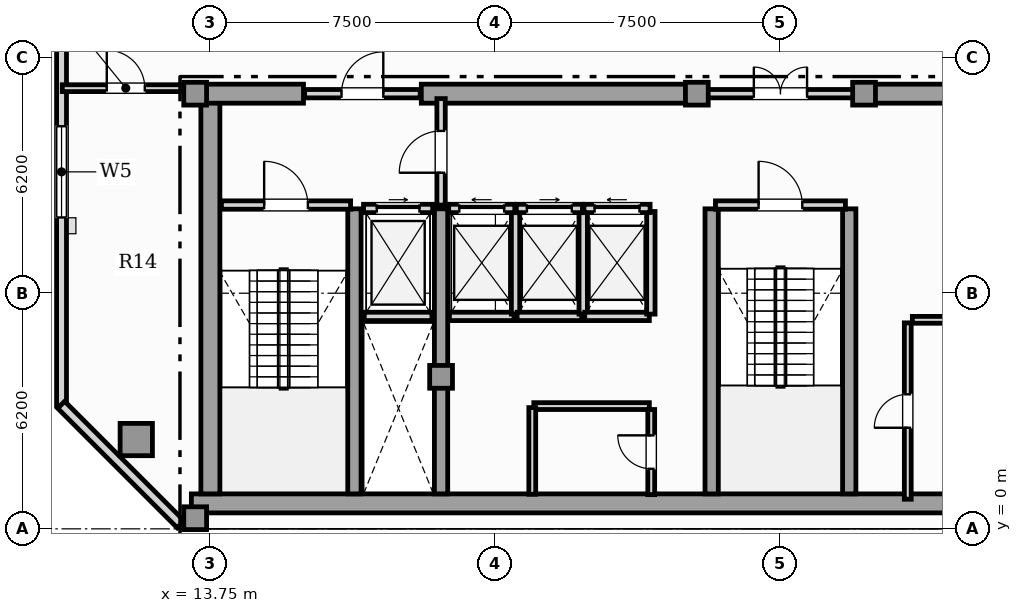
"""IFC4 building model, lengths in metres.
Left out: names, types, materials, properties, quantities, classifications, styles, units other than length and angle.
Written with IfcOpenShell. Run it as: python <this file> out.ifc"""

import sys

from ifc_helpers import new_model, si_unit, direction, frame, frame_2d, origin, origin_2d, place, context, subcontext, project, spatial, rectangle, hollow_rectangle, extrude, element, fill, save


model = new_model("IFC4")
c1 = context("Model", 3, precision=1e-05, world=origin(), true_north=direction((0.0, 1.0)))
c2 = subcontext(c1, "Body", "Model", "MODEL_VIEW")
j1 = project(units=[si_unit("LENGTHUNIT", "METRE"), si_unit("PLANEANGLEUNIT", "RADIAN")], contexts=[c1])
p1 = place(None, origin())
s1 = spatial("IfcSite", under=j1, at=p1, CompositionType="ELEMENT")
p2 = place(p1, origin())
s2 = spatial("IfcBuilding", under=s1, at=p2, CompositionType="ELEMENT")
p3 = place(p2, frame((0.0, 0.0, 357.85)))
s3 = spatial("IfcBuildingStorey", under=s2, at=p3, CompositionType="ELEMENT", Elevation=357.85)
p4 = place(p3, frame((13.25, 0.67, 0.0), z_axis=(0.0, 0.0, 1.0), x_axis=(1.0, 0.0, 0.0)))
e1 = element("IfcWall", 1, at=p4, inside=s3, PredefinedType="SHEAR", context=c2, shape_type="SweptSolid", body=[
    extrude(rectangle(XDim=31.0, YDim=0.5, at=frame_2d((15.5, 0.0))), origin(), (0.0, 0.0, 1.0), 4.14),
])
p5 = place(p3, frame((13.75, 0.92, 0.0), z_axis=(0.0, 0.0, 1.0), x_axis=(0.0, 1.0, 0.0)))
e2 = element("IfcWall", 2, at=p5, inside=s3, PredefinedType="SHEAR", context=c2, shape_type="SweptSolid", body=[
    extrude(rectangle(XDim=10.53, YDim=0.5, at=frame_2d((5.265, 0.0))), origin(), (0.0, 0.0, 1.0), 4.14),
])
p6 = place(p3, frame((13.25, 11.45, 0.0), z_axis=(0.0, 0.0, 1.0), x_axis=(1.0, 0.0, 0.0)))
e3 = element("IfcWall", 3, at=p6, inside=s3, PredefinedType="SHEAR", context=c2, shape_type="SweptSolid", body=[
    extrude(rectangle(XDim=2.95, YDim=0.5, at=frame_2d((1.475, 0.0))), origin(), (0.0, 0.0, 1.0), 4.14),
])
for number, where, z_axis, x_axis in (
    (4, (19.3, 11.45, 0.0), (0.0, 0.0, 1.0), (1.0, 0.0, 0.0)),
    (5, (30.9, 11.45, 0.0), (0.0, 0.0, 1.0), (1.0, 0.0, 0.0)),
):
    element("IfcWall", number, at=place(p3, frame(where, z_axis=z_axis, x_axis=x_axis)), inside=s3, PredefinedType="SHEAR", context=c2, shape_type="SweptSolid", body=[
        extrude(rectangle(XDim=7.3, YDim=0.5, at=frame_2d((3.65, 0.0))), origin(), (0.0, 0.0, 1.0), 4.14),
    ])
for number, where, z_axis, x_axis in (
    (6, (17.54, 0.92, 0.0), (0.0, 0.0, 1.0), (0.0, 1.0, 0.0)),
    (7, (19.82, 0.92, 0.0), (0.0, 0.0, 1.0), (0.0, 1.0, 0.0)),
    (8, (26.94, 0.92, 0.0), (0.0, 0.0, 1.0), (0.0, 1.0, 0.0)),
    (9, (30.56, 0.92, 0.0), (0.0, 0.0, 1.0), (0.0, 1.0, 0.0)),
):
    element("IfcWall", number, at=place(p3, frame(where, z_axis=z_axis, x_axis=x_axis)), inside=s3, PredefinedType="SHEAR", context=c2, shape_type="SweptSolid", body=[
        extrude(rectangle(XDim=7.5, YDim=0.35, at=frame_2d((3.75, 0.0))), origin(), (0.0, 0.0, 1.0), 4.14),
    ])
for number, where, z_axis, x_axis in (
    (10, (13.35, 0.28, 0.0), (0.0, 0.0, 1.0), (1.0, 0.0, 0.0)),
    (11, (13.35, 11.45, 0.0), (0.0, 0.0, 1.0), (1.0, 0.0, 0.0)),
    (12, (19.82, 4.0, 0.0), (0.0, 0.0, 1.0), (1.0, 0.0, 0.0)),
    (13, (26.55, 11.45, 0.0), (0.0, 0.0, 1.0), (1.0, 0.0, 0.0)),
    (14, (30.95, 11.45, 0.0), (0.0, 0.0, 1.0), (1.0, 0.0, 0.0)),
):
    element("IfcColumn", number, at=place(p3, frame(where, z_axis=z_axis, x_axis=x_axis)), inside=s3, PredefinedType="COLUMN", context=c2, shape_type="SweptSolid", body=[
        extrude(rectangle(XDim=0.6, YDim=0.6, at=origin_2d()), origin(), (0.0, 0.0, 1.0), 4.4),
    ])
p7 = place(p3, frame((11.8, 2.35, 0.0), z_axis=(0.0, 0.0, 1.0), x_axis=(1.0, 0.0, 0.0)))
e15 = element("IfcColumn", 15, at=p7, inside=s3, PredefinedType="USERDEFINED", context=c2, shape_type="SweptSolid", body=[
    extrude(hollow_rectangle(XDim=0.85, YDim=0.85, WallThickness=0.05, at=origin_2d()), origin(), (0.0, 0.0, 1.0), 4.4),
])
p8 = place(p3, frame((9.834, 27.586, 0.0), z_axis=(0.0, 0.0, 1.0), x_axis=(0.0, -1.0, 0.0)))
e16 = element("IfcWall", 16, at=p8, inside=s3, PredefinedType="SOLIDWALL", context=c2, shape_type="SweptSolid", body=[
    extrude(rectangle(XDim=24.346, YDim=0.26, at=frame_2d((12.173, 0.0))), origin(), (0.0, 0.0, 1.0), 4.14),
])
p9 = place(p8, frame((16.992, 0.0, 0.85)))
e17 = element("IfcOpeningElement", 17, at=p9, cuts=e16, PredefinedType="OPENING", context=c2, shape_type="SweptSolid", body=[
    extrude(rectangle(XDim=2.4, YDim=2.0, at=frame_2d((1.2, 1.0))), frame((0.0, 0.14, 0.0), z_axis=(0.0, -1.0, 0.0), x_axis=(1.0, 0.0, 0.0)), (0.0, 0.0, 1.0), 0.28),
])
p10 = place(p8, frame((2.83, 0.0, 0.95)))
e18 = element("IfcOpeningElement", 18, at=p10, cuts=e16, PredefinedType="OPENING", context=c2, shape_type="SweptSolid", body=[
    extrude(rectangle(XDim=0.9, YDim=1.5, at=frame_2d((0.45, 0.75))), frame((0.0, 0.14, 0.0), z_axis=(0.0, -1.0, 0.0), x_axis=(1.0, 0.0, 0.0)), (0.0, 0.0, 1.0), 0.28),
])
p11 = place(p3, frame((9.824, 3.264, 0.0), z_axis=(0.0, 0.0, 1.0), x_axis=(0.707079321262, -0.707134240044, 0.0)))
e19 = element("IfcWall", 19, at=p11, inside=s3, PredefinedType="SOLIDWALL", context=c2, shape_type="SweptSolid", body=[
    extrude(rectangle(XDim=4.446, YDim=0.26, at=frame_2d((2.223, 0.0))), origin(), (0.0, 0.0, 1.0), 4.14),
])
p12 = place(p3, frame((17.8, 5.59, 0.0), z_axis=(0.0, 0.0, 1.0), x_axis=(1.0, 0.0, 0.0)))
e20 = element("IfcWall", 20, at=p12, inside=s3, PredefinedType="SOLIDWALL", context=c2, shape_type="SweptSolid", body=[
    extrude(rectangle(XDim=1.78, YDim=0.22, at=frame_2d((0.89, 0.0))), origin(), (0.0, 0.0, 1.0), 4.14),
])
p13 = place(p3, frame((17.78, 8.43, 0.0), z_axis=(0.0, 0.0, 1.0), x_axis=(1.0, 0.0, 0.0)))
e21 = element("IfcWall", 21, at=p13, inside=s3, PredefinedType="SOLIDWALL", context=c2, shape_type="SweptSolid", body=[
    extrude(rectangle(XDim=1.82, YDim=0.22, at=frame_2d((0.91, 0.0))), origin(), (0.0, 0.0, 1.0), 4.14),
])
p14 = place(p13, frame((0.35, 0.0, 0.0)))
e22 = element("IfcOpeningElement", 22, at=p14, cuts=e21, PredefinedType="OPENING", context=c2, shape_type="SweptSolid", body=[
    extrude(rectangle(XDim=1.12, YDim=2.25, at=frame_2d((0.56, 1.125))), frame((0.0, 0.12, 0.0), z_axis=(0.0, -1.0, 0.0), x_axis=(1.0, 0.0, 0.0)), (0.0, 0.0, 1.0), 0.24),
])
p15 = place(p3, frame((20.04, 5.59, 0.0), z_axis=(0.0, 0.0, 1.0), x_axis=(1.0, 0.0, 0.0)))
e23 = element("IfcWall", 23, at=p15, inside=s3, PredefinedType="SOLIDWALL", context=c2, shape_type="SweptSolid", body=[
    extrude(rectangle(XDim=1.7, YDim=0.22, at=frame_2d((0.85, 0.0))), origin(), (0.0, 0.0, 1.0), 4.14),
])
p16 = place(p3, frame((21.78, 5.65, 0.0), z_axis=(0.0, 0.0, 1.0), x_axis=(0.0, 1.0, 0.0)))
e24 = element("IfcWall", 24, at=p16, inside=s3, PredefinedType="SOLIDWALL", context=c2, shape_type="SweptSolid", body=[
    extrude(rectangle(XDim=2.7, YDim=0.22, at=frame_2d((1.35, 0.0))), origin(), (0.0, 0.0, 1.0), 4.14),
])
p17 = place(p3, frame((20.02, 8.43, 0.0), z_axis=(0.0, 0.0, 1.0), x_axis=(1.0, 0.0, 0.0)))
e25 = element("IfcWall", 25, at=p17, inside=s3, PredefinedType="SOLIDWALL", context=c2, shape_type="SweptSolid", body=[
    extrude(rectangle(XDim=1.74, YDim=0.22, at=frame_2d((0.87, 0.0))), origin(), (0.0, 0.0, 1.0), 4.14),
])
p18 = place(p17, frame((0.28, 0.0, 0.0)))
e26 = element("IfcOpeningElement", 26, at=p18, cuts=e25, PredefinedType="OPENING", context=c2, shape_type="SweptSolid", body=[
    extrude(rectangle(XDim=1.18, YDim=2.2, at=frame_2d((0.59, 1.1))), frame((0.0, 0.12, 0.0), z_axis=(0.0, -1.0, 0.0), x_axis=(1.0, 0.0, 0.0)), (0.0, 0.0, 1.0), 0.24),
])
p19 = place(p3, frame((21.82, 5.59, 0.0), z_axis=(0.0, 0.0, 1.0), x_axis=(1.0, 0.0, 0.0)))
e27 = element("IfcWall", 27, at=p19, inside=s3, PredefinedType="SOLIDWALL", context=c2, shape_type="SweptSolid", body=[
    extrude(rectangle(XDim=1.7, YDim=0.22, at=frame_2d((0.85, 0.0))), origin(), (0.0, 0.0, 1.0), 4.14),
])
p20 = place(p3, frame((23.56, 5.65, 0.0), z_axis=(0.0, 0.0, 1.0), x_axis=(0.0, 1.0, 0.0)))
e28 = element("IfcWall", 28, at=p20, inside=s3, PredefinedType="SOLIDWALL", context=c2, shape_type="SweptSolid", body=[
    extrude(rectangle(XDim=2.7, YDim=0.22, at=frame_2d((1.35, 0.0))), origin(), (0.0, 0.0, 1.0), 4.14),
])
p21 = place(p3, frame((21.8, 8.43, 0.0), z_axis=(0.0, 0.0, 1.0), x_axis=(1.0, 0.0, 0.0)))
e29 = element("IfcWall", 29, at=p21, inside=s3, PredefinedType="SOLIDWALL", context=c2, shape_type="SweptSolid", body=[
    extrude(rectangle(XDim=1.74, YDim=0.22, at=frame_2d((0.87, 0.0))), origin(), (0.0, 0.0, 1.0), 4.14),
])
p22 = place(p21, frame((0.28, 0.0, 0.0)))
e30 = element("IfcOpeningElement", 30, at=p22, cuts=e29, PredefinedType="OPENING", context=c2, shape_type="SweptSolid", body=[
    extrude(rectangle(XDim=1.18, YDim=2.2, at=frame_2d((0.59, 1.1))), frame((0.0, 0.12, 0.0), z_axis=(0.0, -1.0, 0.0), x_axis=(1.0, 0.0, 0.0)), (0.0, 0.0, 1.0), 0.24),
])
p23 = place(p3, frame((23.6, 5.59, 0.0), z_axis=(0.0, 0.0, 1.0), x_axis=(1.0, 0.0, 0.0)))
e31 = element("IfcWall", 31, at=p23, inside=s3, PredefinedType="SOLIDWALL", context=c2, shape_type="SweptSolid", body=[
    extrude(rectangle(XDim=1.7, YDim=0.22, at=frame_2d((0.85, 0.0))), origin(), (0.0, 0.0, 1.0), 4.14),
])
p24 = place(p3, frame((25.34, 5.65, 0.0), z_axis=(0.0, 0.0, 1.0), x_axis=(0.0, 1.0, 0.0)))
e32 = element("IfcWall", 32, at=p24, inside=s3, PredefinedType="SOLIDWALL", context=c2, shape_type="SweptSolid", body=[
    extrude(rectangle(XDim=2.7, YDim=0.22, at=frame_2d((1.35, 0.0))), origin(), (0.0, 0.0, 1.0), 4.14),
])
p25 = place(p3, frame((23.58, 8.43, 0.0), z_axis=(0.0, 0.0, 1.0), x_axis=(1.0, 0.0, 0.0)))
e33 = element("IfcWall", 33, at=p25, inside=s3, PredefinedType="SOLIDWALL", context=c2, shape_type="SweptSolid", body=[
    extrude(rectangle(XDim=1.74, YDim=0.22, at=frame_2d((0.87, 0.0))), origin(), (0.0, 0.0, 1.0), 4.14),
])
p26 = place(p25, frame((0.28, 0.0, 0.0)))
e34 = element("IfcOpeningElement", 34, at=p26, cuts=e33, PredefinedType="OPENING", context=c2, shape_type="SweptSolid", body=[
    extrude(rectangle(XDim=1.18, YDim=2.2, at=frame_2d((0.59, 1.1))), frame((0.0, 0.12, 0.0), z_axis=(0.0, -1.0, 0.0), x_axis=(1.0, 0.0, 0.0)), (0.0, 0.0, 1.0), 0.24),
])
p27 = place(p3, frame((14.04, 8.52, 0.0), z_axis=(0.0, 0.0, 1.0), x_axis=(1.0, 0.0, 0.0)))
e35 = element("IfcWall", 35, at=p27, inside=s3, PredefinedType="SOLIDWALL", context=c2, shape_type="SweptSolid", body=[
    extrude(rectangle(XDim=3.4, YDim=0.22, at=frame_2d((1.7, 0.0))), origin(), (0.0, 0.0, 1.0), 4.14),
])
p28 = place(p27, frame((1.125, 0.0, 0.0)))
e36 = element("IfcOpeningElement", 36, at=p28, cuts=e35, PredefinedType="OPENING", context=c2, shape_type="SweptSolid", body=[
    extrude(rectangle(XDim=1.15, YDim=2.2, at=frame_2d((0.575, 1.1))), frame((0.0, 0.12, 0.0), z_axis=(0.0, -1.0, 0.0), x_axis=(1.0, 0.0, 0.0)), (0.0, 0.0, 1.0), 0.24),
])
p29 = place(p3, frame((27.04, 8.52, 0.0), z_axis=(0.0, 0.0, 1.0), x_axis=(1.0, 0.0, 0.0)))
e37 = element("IfcWall", 37, at=p29, inside=s3, PredefinedType="SOLIDWALL", context=c2, shape_type="SweptSolid", body=[
    extrude(rectangle(XDim=3.42, YDim=0.22, at=frame_2d((1.71, 0.0))), origin(), (0.0, 0.0, 1.0), 4.14),
])
p30 = place(p29, frame((1.135, 0.0, 0.0)))
e38 = element("IfcOpeningElement", 38, at=p30, cuts=e37, PredefinedType="OPENING", context=c2, shape_type="SweptSolid", body=[
    extrude(rectangle(XDim=1.15, YDim=2.2, at=frame_2d((0.575, 1.1))), frame((0.0, 0.12, 0.0), z_axis=(0.0, -1.0, 0.0), x_axis=(1.0, 0.0, 0.0)), (0.0, 0.0, 1.0), 0.24),
])
p31 = place(p3, frame((19.82, 8.52, 0.0), z_axis=(0.0, 0.0, 1.0), x_axis=(0.0, 1.0, 0.0)))
e39 = element("IfcWall", 39, at=p31, inside=s3, PredefinedType="SOLIDWALL", context=c2, shape_type="SweptSolid", body=[
    extrude(rectangle(XDim=2.8, YDim=0.22, at=frame_2d((1.4, 0.0))), origin(), (0.0, 0.0, 1.0), 3.595),
])
p32 = place(p31, frame((0.85, 0.0, 0.0)))
e40 = element("IfcOpeningElement", 40, at=p32, cuts=e39, PredefinedType="OPENING", context=c2, shape_type="SweptSolid", body=[
    extrude(rectangle(XDim=1.1, YDim=2.2, at=frame_2d((0.55, 1.1))), frame((0.0, 0.12, 0.0), z_axis=(0.0, -1.0, 0.0), x_axis=(1.0, 0.0, 0.0)), (0.0, 0.0, 1.0), 0.24),
])
p33 = place(p3, frame((16.23, 11.45, 0.0), z_axis=(0.0, 0.0, 1.0), x_axis=(1.0, 0.0, 0.0)))
e41 = element("IfcWall", 41, at=p33, inside=s3, PredefinedType="SOLIDWALL", context=c2, shape_type="SweptSolid", body=[
    extrude(rectangle(XDim=3.04, YDim=0.22, at=frame_2d((1.52, 0.0))), origin(), (0.0, 0.0, 1.0), 4.14),
])
p34 = place(p33, frame((0.97, 0.0, 0.0)))
e42 = element("IfcOpeningElement", 42, at=p34, cuts=e41, PredefinedType="OPENING", context=c2, shape_type="SweptSolid", body=[
    extrude(rectangle(XDim=1.1, YDim=2.2, at=frame_2d((0.55, 1.1))), frame((0.0, 0.12, 0.0), z_axis=(0.0, -1.0, 0.0), x_axis=(1.0, 0.0, 0.0)), (0.0, 0.0, 1.0), 0.24),
])
p35 = place(p3, frame((26.63, 11.45, 0.0), z_axis=(0.0, 0.0, 1.0), x_axis=(1.0, 0.0, 0.0)))
e43 = element("IfcWall", 43, at=p35, inside=s3, PredefinedType="SOLIDWALL", context=c2, shape_type="SweptSolid", body=[
    extrude(rectangle(XDim=4.24, YDim=0.22, at=frame_2d((2.12, 0.0))), origin(), (0.0, 0.0, 1.0), 4.14),
])
p36 = place(p35, frame((1.42, 0.0, 0.0)))
e44 = element("IfcOpeningElement", 44, at=p36, cuts=e43, PredefinedType="OPENING", context=c2, shape_type="SweptSolid", body=[
    extrude(rectangle(XDim=1.4, YDim=2.2, at=frame_2d((0.7, 1.1))), frame((0.0, 0.12, 0.0), z_axis=(0.0, -1.0, 0.0), x_axis=(1.0, 0.0, 0.0)), (0.0, 0.0, 1.0), 0.24),
])
p37 = place(p3, frame((25.35, 0.9, 0.0), z_axis=(0.0, 0.0, 1.0), x_axis=(0.0, 1.0, 0.0)))
e45 = element("IfcWall", 45, at=p37, inside=s3, PredefinedType="PARTITIONING", context=c2, shape_type="SweptSolid", body=[
    extrude(rectangle(XDim=2.24, YDim=0.18, at=frame_2d((1.12, 0.0))), origin(), (0.0, 0.0, 1.0), 4.14),
])
p38 = place(p37, frame((0.68, 0.0, 0.0)))
e46 = element("IfcOpeningElement", 46, at=p38, cuts=e45, PredefinedType="OPENING", context=c2, shape_type="SweptSolid", body=[
    extrude(rectangle(XDim=0.88, YDim=2.05, at=frame_2d((0.44, 1.025))), frame((0.0, 0.1, 0.0), z_axis=(0.0, -1.0, 0.0), x_axis=(1.0, 0.0, 0.0)), (0.0, 0.0, 1.0), 0.2),
])
p39 = place(p3, frame((22.26, 3.23, 0.0), z_axis=(0.0, 0.0, 1.0), x_axis=(1.0, 0.0, 0.0)))
e47 = element("IfcWall", 47, at=p39, inside=s3, PredefinedType="PARTITIONING", context=c2, shape_type="SweptSolid", body=[
    extrude(rectangle(XDim=3.04, YDim=0.18, at=frame_2d((1.52, 0.0))), origin(), (0.0, 0.0, 1.0), 4.14),
])
p40 = place(p3, frame((22.22, 0.91, 0.0), z_axis=(0.0, 0.0, 1.0), x_axis=(0.0, 1.0, 0.0)))
e48 = element("IfcWall", 48, at=p40, inside=s3, PredefinedType="PARTITIONING", context=c2, shape_type="SweptSolid", body=[
    extrude(rectangle(XDim=2.28, YDim=0.18, at=frame_2d((1.14, 0.0))), origin(), (0.0, 0.0, 1.0), 4.14),
])
p41 = place(p3, frame((32.1, 0.78, 0.0), z_axis=(0.0, 0.0, 1.0), x_axis=(0.0, 1.0, 0.0)))
e49 = element("IfcWall", 49, at=p41, inside=s3, PredefinedType="PARTITIONING", context=c2, shape_type="SweptSolid", body=[
    extrude(rectangle(XDim=4.64, YDim=0.18, at=frame_2d((2.32, 0.0))), origin(), (0.0, 0.0, 1.0), 4.14),
])
p42 = place(p41, frame((1.88, 0.0, 0.0)))
e50 = element("IfcOpeningElement", 50, at=p42, cuts=e49, PredefinedType="OPENING", context=c2, shape_type="SweptSolid", body=[
    extrude(rectangle(XDim=0.88, YDim=2.05, at=frame_2d((0.44, 1.025))), frame((0.0, 0.1, 0.0), z_axis=(0.0, -1.0, 0.0), x_axis=(1.0, 0.0, 0.0)), (0.0, 0.0, 1.0), 0.2),
])
p43 = place(p3, frame((32.22, 5.5, 0.0), z_axis=(0.0, 0.0, 1.0), x_axis=(1.0, 0.0, 0.0)))
e51 = element("IfcWall", 51, at=p43, inside=s3, PredefinedType="PARTITIONING", context=c2, shape_type="SweptSolid", body=[
    extrude(rectangle(XDim=2.9, YDim=0.18, at=frame_2d((1.45, 0.0))), origin(), (0.0, 0.0, 1.0), 4.14),
])
p44 = place(p3, frame((9.854, 11.595, 0.0), z_axis=(0.0, 0.0, 1.0), x_axis=(1.0, 0.0, 0.0)))
e52 = element("IfcWall", 52, at=p44, inside=s3, PredefinedType="PARTITIONING", context=c2, shape_type="SweptSolid", body=[
    extrude(rectangle(XDim=3.342, YDim=0.18, at=frame_2d((1.671, 0.0))), origin(), (0.0, 0.0, 1.0), 4.14),
])
p45 = place(p44, frame((1.171, 0.0, 0.0)))
e53 = element("IfcOpeningElement", 53, at=p45, cuts=e52, PredefinedType="OPENING", context=c2, shape_type="SweptSolid", body=[
    extrude(rectangle(XDim=1.0, YDim=2.15, at=frame_2d((0.5, 1.075))), frame((0.0, 0.1, 0.0), z_axis=(0.0, -1.0, 0.0), x_axis=(1.0, 0.0, 0.0)), (0.0, 0.0, 1.0), 0.2),
])
p46 = place(p9, origin())
e54 = element("IfcWindow", 54, at=p46, inside=s3, PartitioningType="SINGLE_PANEL", PredefinedType="WINDOW", context=c2, shape_type="SweptSolid", body=[
    extrude(rectangle(XDim=2.4, YDim=2.0, at=frame_2d((1.2, 1.0))), frame((0.0, 0.03, 0.0), z_axis=(0.0, -1.0, 0.0), x_axis=(1.0, 0.0, 0.0)), (0.0, 0.0, 1.0), 0.06),
])
fill(e17, e54)
p47 = place(p14, origin())
e55 = element("IfcDoor", 55, at=p47, inside=s3, OperationType="SLIDING_TO_RIGHT", PredefinedType="DOOR", context=c2, shape_type="SweptSolid", body=[
    extrude(rectangle(XDim=1.12, YDim=2.25, at=frame_2d((0.56, 1.125))), frame((0.0, 0.025, 0.0), z_axis=(0.0, -1.0, 0.0), x_axis=(1.0, 0.0, 0.0)), (0.0, 0.0, 1.0), 0.05),
])
fill(e22, e55)
p48 = place(p18, origin())
e56 = element("IfcDoor", 56, at=p48, inside=s3, OperationType="SLIDING_TO_LEFT", PredefinedType="DOOR", context=c2, shape_type="SweptSolid", body=[
    extrude(rectangle(XDim=1.18, YDim=2.2, at=frame_2d((0.59, 1.1))), frame((0.0, 0.025, 0.0), z_axis=(0.0, -1.0, 0.0), x_axis=(1.0, 0.0, 0.0)), (0.0, 0.0, 1.0), 0.05),
])
fill(e26, e56)
p49 = place(p22, origin())
e57 = element("IfcDoor", 57, at=p49, inside=s3, OperationType="SLIDING_TO_RIGHT", PredefinedType="DOOR", context=c2, shape_type="SweptSolid", body=[
    extrude(rectangle(XDim=1.18, YDim=2.2, at=frame_2d((0.59, 1.1))), frame((0.0, 0.025, 0.0), z_axis=(0.0, -1.0, 0.0), x_axis=(1.0, 0.0, 0.0)), (0.0, 0.0, 1.0), 0.05),
])
fill(e30, e57)
p50 = place(p26, origin())
e58 = element("IfcDoor", 58, at=p50, inside=s3, OperationType="SLIDING_TO_LEFT", PredefinedType="DOOR", context=c2, shape_type="SweptSolid", body=[
    extrude(rectangle(XDim=1.18, YDim=2.2, at=frame_2d((0.59, 1.1))), frame((0.0, 0.025, 0.0), z_axis=(0.0, -1.0, 0.0), x_axis=(1.0, 0.0, 0.0)), (0.0, 0.0, 1.0), 0.05),
])
fill(e34, e58)
p51 = place(p28, origin())
e59 = element("IfcDoor", 59, at=p51, inside=s3, OperationType="SINGLE_SWING_LEFT", PredefinedType="DOOR", context=c2, shape_type="SweptSolid", body=[
    extrude(rectangle(XDim=1.15, YDim=2.2, at=frame_2d((0.575, 1.1))), frame((0.0, 0.025, 0.0), z_axis=(0.0, -1.0, 0.0), x_axis=(1.0, 0.0, 0.0)), (0.0, 0.0, 1.0), 0.05),
])
fill(e36, e59)
p52 = place(p30, origin())
e60 = element("IfcDoor", 60, at=p52, inside=s3, OperationType="SINGLE_SWING_LEFT", PredefinedType="DOOR", context=c2, shape_type="SweptSolid", body=[
    extrude(rectangle(XDim=1.15, YDim=2.2, at=frame_2d((0.575, 1.1))), frame((0.0, 0.025, 0.0), z_axis=(0.0, -1.0, 0.0), x_axis=(1.0, 0.0, 0.0)), (0.0, 0.0, 1.0), 0.05),
])
fill(e38, e60)
p53 = place(p32, origin())
e61 = element("IfcDoor", 61, at=p53, inside=s3, OperationType="SINGLE_SWING_LEFT", PredefinedType="DOOR", context=c2, shape_type="SweptSolid", body=[
    extrude(rectangle(XDim=1.1, YDim=2.2, at=frame_2d((0.55, 1.1))), frame((0.0, 0.025, 0.0), z_axis=(0.0, -1.0, 0.0), x_axis=(1.0, 0.0, 0.0)), (0.0, 0.0, 1.0), 0.05),
])
fill(e40, e61)
p54 = place(p34, origin())
e62 = element("IfcDoor", 62, at=p54, inside=s3, OperationType="SINGLE_SWING_RIGHT", PredefinedType="DOOR", context=c2, shape_type="SweptSolid", body=[
    extrude(rectangle(XDim=1.1, YDim=2.2, at=frame_2d((0.55, 1.1))), frame((0.0, 0.025, 0.0), z_axis=(0.0, -1.0, 0.0), x_axis=(1.0, 0.0, 0.0)), (0.0, 0.0, 1.0), 0.05),
])
fill(e42, e62)
p55 = place(p36, origin())
e63 = element("IfcDoor", 63, at=p55, inside=s3, OperationType="DOUBLE_DOOR_SINGLE_SWING", PredefinedType="DOOR", context=c2, shape_type="SweptSolid", body=[
    extrude(rectangle(XDim=1.4, YDim=2.2, at=frame_2d((0.7, 1.1))), frame((0.0, 0.025, 0.0), z_axis=(0.0, -1.0, 0.0), x_axis=(1.0, 0.0, 0.0)), (0.0, 0.0, 1.0), 0.05),
])
fill(e44, e63)
p56 = place(p38, origin())
e64 = element("IfcDoor", 64, at=p56, inside=s3, OperationType="SINGLE_SWING_RIGHT", PredefinedType="DOOR", context=c2, shape_type="SweptSolid", body=[
    extrude(rectangle(XDim=0.88, YDim=2.05, at=frame_2d((0.44, 1.025))), frame((0.0, 0.025, 0.0), z_axis=(0.0, -1.0, 0.0), x_axis=(1.0, 0.0, 0.0)), (0.0, 0.0, 1.0), 0.05),
])
fill(e46, e64)
p57 = place(p42, origin())
e65 = element("IfcDoor", 65, at=p57, inside=s3, OperationType="SINGLE_SWING_LEFT", PredefinedType="DOOR", context=c2, shape_type="SweptSolid", body=[
    extrude(rectangle(XDim=0.88, YDim=2.05, at=frame_2d((0.44, 1.025))), frame((0.0, 0.025, 0.0), z_axis=(0.0, -1.0, 0.0), x_axis=(1.0, 0.0, 0.0)), (0.0, 0.0, 1.0), 0.05),
])
fill(e50, e65)
p58 = place(p45, origin())
e66 = element("IfcDoor", 66, at=p58, inside=s3, OperationType="SINGLE_SWING_LEFT", PredefinedType="DOOR", context=c2, shape_type="SweptSolid", body=[
    extrude(rectangle(XDim=1.0, YDim=2.15, at=frame_2d((0.5, 1.075))), frame((0.0, 0.025, 0.0), z_axis=(0.0, -1.0, 0.0), x_axis=(1.0, 0.0, 0.0)), (0.0, 0.0, 1.0), 0.05),
])
fill(e53, e66)
save(model, sys.argv[1])
